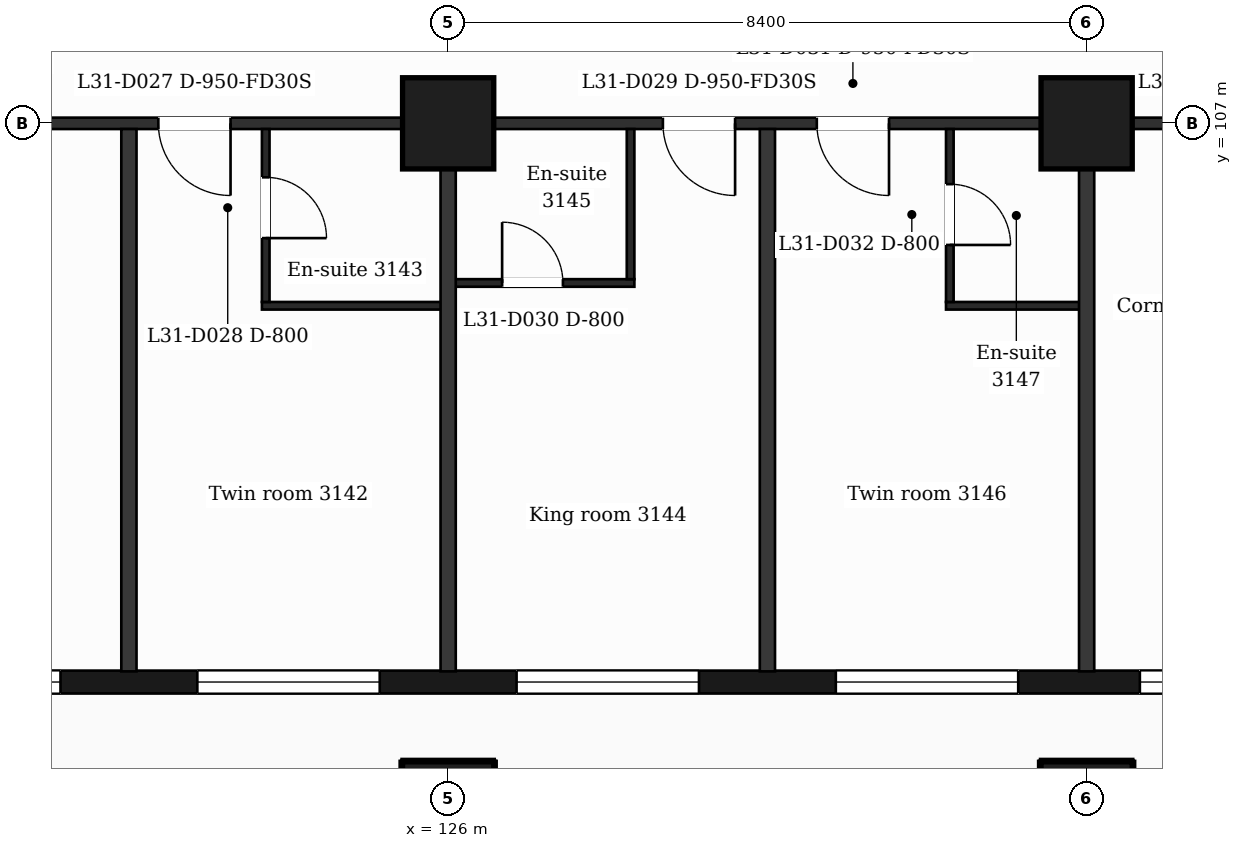
"""IFC4 building model, lengths in metres.
Left out: names, types, materials, properties, quantities, classifications, styles, units other than length and angle.
Written with IfcOpenShell. Run it as: python <this file> out.ifc"""

import sys

from ifc_helpers import new_model, si_unit, direction, frame, frame_2d, origin, origin_2d, place, context, subcontext, project, spatial, rectangle, extrude, element, fill, save


model = new_model("IFC4")
c1 = context("Model", 3, precision=1e-05, world=origin(), true_north=direction((0.0, 1.0)))
c2 = subcontext(c1, "Body", "Model", "MODEL_VIEW")
j1 = project(units=[si_unit("LENGTHUNIT", "METRE"), si_unit("PLANEANGLEUNIT", "RADIAN")], contexts=[c1])
p1 = place(None, origin())
s1 = spatial("IfcSite", under=j1, at=p1, CompositionType="ELEMENT")
p2 = place(p1, origin())
s2 = spatial("IfcBuilding", under=s1, at=p2, CompositionType="ELEMENT")
p3 = place(p2, frame((0.0, 0.0, 131.7)))
s3 = spatial("IfcBuildingStorey", under=s2, at=p3, CompositionType="ELEMENT", Elevation=131.7)
for number, where, z_axis, x_axis in (
    (1, (126.0, 98.0, 0.0), (0.0, 0.0, 1.0), (1.0, 0.0, 0.0)),
    (2, (134.4, 98.0, 0.0), (0.0, 0.0, 1.0), (1.0, 0.0, 0.0)),
    (3, (126.0, 107.0, 0.0), (0.0, 0.0, 1.0), (1.0, 0.0, 0.0)),
    (4, (134.4, 107.0, 0.0), (0.0, 0.0, 1.0), (1.0, 0.0, 0.0)),
):
    element("IfcColumn", number, at=place(p3, frame(where, z_axis=z_axis, x_axis=x_axis)), inside=s3, PredefinedType="COLUMN", context=c2, shape_type="SweptSolid", body=[
        extrude(rectangle(XDim=1.2, YDim=1.2, at=origin_2d()), origin(), (0.0, 0.0, 1.0), 3.7),
    ])
p4 = place(p3, frame((89.85, 99.65, 0.0), z_axis=(0.0, 0.0, 1.0), x_axis=(1.0, 0.0, 0.0)))
e5 = element("IfcWall", 5, at=p4, inside=s3, PredefinedType="SOLIDWALL", context=c2, shape_type="SweptSolid", body=[
    extrude(rectangle(XDim=47.25, YDim=0.3, at=frame_2d((23.625, 0.0))), origin(), (0.0, 0.0, 1.0), 3.2),
])
p5 = place(p4, frame((0.725, 0.0, 0.9)))
e6 = element("IfcOpeningElement", 6, at=p5, cuts=e5, PredefinedType="OPENING", context=c2, shape_type="SweptSolid", body=[
    extrude(rectangle(XDim=1.2, YDim=2.1, at=frame_2d((0.6, 1.05))), frame((0.0, 0.16, 0.0), z_axis=(0.0, -1.0, 0.0), x_axis=(1.0, 0.0, 0.0)), (0.0, 0.0, 1.0), 0.32),
])
p6 = place(p4, frame((3.45, 0.0, 0.9)))
e7 = element("IfcOpeningElement", 7, at=p6, cuts=e5, PredefinedType="OPENING", context=c2, shape_type="SweptSolid", body=[
    extrude(rectangle(XDim=2.4, YDim=2.1, at=frame_2d((1.2, 1.05))), frame((0.0, 0.16, 0.0), z_axis=(0.0, -1.0, 0.0), x_axis=(1.0, 0.0, 0.0)), (0.0, 0.0, 1.0), 0.32),
])
p7 = place(p4, frame((7.35, 0.0, 0.0)))
e8 = element("IfcOpeningElement", 8, at=p7, cuts=e5, PredefinedType="OPENING", context=c2, shape_type="SweptSolid", body=[
    extrude(rectangle(XDim=1.2, YDim=2.4, at=frame_2d((0.6, 1.2))), frame((0.0, 0.16, 0.0), z_axis=(0.0, -1.0, 0.0), x_axis=(1.0, 0.0, 0.0)), (0.0, 0.0, 1.0), 0.32),
])
p8 = place(p4, frame((9.15, 0.0, 0.9)))
e9 = element("IfcOpeningElement", 9, at=p8, cuts=e5, PredefinedType="OPENING", context=c2, shape_type="SweptSolid", body=[
    extrude(rectangle(XDim=1.2, YDim=2.1, at=frame_2d((0.6, 1.05))), frame((0.0, 0.16, 0.0), z_axis=(0.0, -1.0, 0.0), x_axis=(1.0, 0.0, 0.0)), (0.0, 0.0, 1.0), 0.32),
])
p9 = place(p4, frame((11.85, 0.0, 0.9)))
e10 = element("IfcOpeningElement", 10, at=p9, cuts=e5, PredefinedType="OPENING", context=c2, shape_type="SweptSolid", body=[
    extrude(rectangle(XDim=2.4, YDim=2.1, at=frame_2d((1.2, 1.05))), frame((0.0, 0.16, 0.0), z_axis=(0.0, -1.0, 0.0), x_axis=(1.0, 0.0, 0.0)), (0.0, 0.0, 1.0), 0.32),
])
p10 = place(p4, frame((16.05, 0.0, 0.9)))
e11 = element("IfcOpeningElement", 11, at=p10, cuts=e5, PredefinedType="OPENING", context=c2, shape_type="SweptSolid", body=[
    extrude(rectangle(XDim=2.4, YDim=2.1, at=frame_2d((1.2, 1.05))), frame((0.0, 0.16, 0.0), z_axis=(0.0, -1.0, 0.0), x_axis=(1.0, 0.0, 0.0)), (0.0, 0.0, 1.0), 0.32),
])
p11 = place(p4, frame((20.85, 0.0, 0.9)))
e12 = element("IfcOpeningElement", 12, at=p11, cuts=e5, PredefinedType="OPENING", context=c2, shape_type="SweptSolid", body=[
    extrude(rectangle(XDim=1.2, YDim=2.1, at=frame_2d((0.6, 1.05))), frame((0.0, 0.16, 0.0), z_axis=(0.0, -1.0, 0.0), x_axis=(1.0, 0.0, 0.0)), (0.0, 0.0, 1.0), 0.32),
])
p12 = place(p4, frame((25.05, 0.0, 0.9)))
e13 = element("IfcOpeningElement", 13, at=p12, cuts=e5, PredefinedType="OPENING", context=c2, shape_type="SweptSolid", body=[
    extrude(rectangle(XDim=1.2, YDim=2.1, at=frame_2d((0.6, 1.05))), frame((0.0, 0.16, 0.0), z_axis=(0.0, -1.0, 0.0), x_axis=(1.0, 0.0, 0.0)), (0.0, 0.0, 1.0), 0.32),
])
p13 = place(p4, frame((28.65, 0.0, 0.9)))
e14 = element("IfcOpeningElement", 14, at=p13, cuts=e5, PredefinedType="OPENING", context=c2, shape_type="SweptSolid", body=[
    extrude(rectangle(XDim=2.4, YDim=2.1, at=frame_2d((1.2, 1.05))), frame((0.0, 0.16, 0.0), z_axis=(0.0, -1.0, 0.0), x_axis=(1.0, 0.0, 0.0)), (0.0, 0.0, 1.0), 0.32),
])
p14 = place(p4, frame((32.85, 0.0, 0.9)))
e15 = element("IfcOpeningElement", 15, at=p14, cuts=e5, PredefinedType="OPENING", context=c2, shape_type="SweptSolid", body=[
    extrude(rectangle(XDim=2.4, YDim=2.1, at=frame_2d((1.2, 1.05))), frame((0.0, 0.16, 0.0), z_axis=(0.0, -1.0, 0.0), x_axis=(1.0, 0.0, 0.0)), (0.0, 0.0, 1.0), 0.32),
])
p15 = place(p4, frame((37.05, 0.0, 0.9)))
e16 = element("IfcOpeningElement", 16, at=p15, cuts=e5, PredefinedType="OPENING", context=c2, shape_type="SweptSolid", body=[
    extrude(rectangle(XDim=2.4, YDim=2.1, at=frame_2d((1.2, 1.05))), frame((0.0, 0.16, 0.0), z_axis=(0.0, -1.0, 0.0), x_axis=(1.0, 0.0, 0.0)), (0.0, 0.0, 1.0), 0.32),
])
p16 = place(p4, frame((41.25, 0.0, 0.9)))
e17 = element("IfcOpeningElement", 17, at=p16, cuts=e5, PredefinedType="OPENING", context=c2, shape_type="SweptSolid", body=[
    extrude(rectangle(XDim=2.4, YDim=2.1, at=frame_2d((1.2, 1.05))), frame((0.0, 0.16, 0.0), z_axis=(0.0, -1.0, 0.0), x_axis=(1.0, 0.0, 0.0)), (0.0, 0.0, 1.0), 0.32),
])
p17 = place(p4, frame((45.25, 0.0, 0.9)))
e18 = element("IfcOpeningElement", 18, at=p17, cuts=e5, PredefinedType="OPENING", context=c2, shape_type="SweptSolid", body=[
    extrude(rectangle(XDim=1.2, YDim=2.1, at=frame_2d((0.6, 1.05))), frame((0.0, 0.16, 0.0), z_axis=(0.0, -1.0, 0.0), x_axis=(1.0, 0.0, 0.0)), (0.0, 0.0, 1.0), 0.32),
])
p18 = place(p3, frame((123.55, 104.6, 0.0), z_axis=(0.0, 0.0, 1.0), x_axis=(1.0, 0.0, 0.0)))
e19 = element("IfcWall", 19, at=p18, inside=s3, PredefinedType="PARTITIONING", context=c2, shape_type="SweptSolid", body=[
    extrude(rectangle(XDim=2.45, YDim=0.1, at=frame_2d((1.225, 0.0))), origin(), (0.0, 0.0, 1.0), 3.2),
])
p19 = place(p3, frame((132.55, 104.6, 0.0), z_axis=(0.0, 0.0, 1.0), x_axis=(1.0, 0.0, 0.0)))
e20 = element("IfcWall", 20, at=p19, inside=s3, PredefinedType="PARTITIONING", context=c2, shape_type="SweptSolid", body=[
    extrude(rectangle(XDim=1.85, YDim=0.1, at=frame_2d((0.925, 0.0))), origin(), (0.0, 0.0, 1.0), 3.2),
])
p20 = place(p3, frame((126.0, 104.9, 0.0), z_axis=(0.0, 0.0, 1.0), x_axis=(1.0, 0.0, 0.0)))
e21 = element("IfcWall", 21, at=p20, inside=s3, PredefinedType="PARTITIONING", context=c2, shape_type="SweptSolid", body=[
    extrude(rectangle(XDim=2.45, YDim=0.1, at=frame_2d((1.225, 0.0))), origin(), (0.0, 0.0, 1.0), 3.2),
])
p21 = place(p20, frame((0.71, 0.0, 0.0)))
e22 = element("IfcOpeningElement", 22, at=p21, cuts=e21, PredefinedType="OPENING", context=c2, shape_type="SweptSolid", body=[
    extrude(rectangle(XDim=0.8, YDim=2.1, at=frame_2d((0.4, 1.05))), frame((0.0, 0.06, 0.0), z_axis=(0.0, -1.0, 0.0), x_axis=(1.0, 0.0, 0.0)), (0.0, 0.0, 1.0), 0.12),
])
p22 = place(p3, frame((87.018, 107.0, 0.0), z_axis=(0.0, 0.0, 1.0), x_axis=(1.0, 0.0, 0.0)))
e23 = element("IfcWall", 23, at=p22, inside=s3, PredefinedType="PARTITIONING", context=c2, shape_type="SweptSolid", body=[
    extrude(rectangle(XDim=52.765, YDim=0.15, at=frame_2d((26.382, 0.0))), origin(), (0.0, 0.0, 1.0), 3.2),
])
p23 = place(p22, frame((1.276, 0.0, 0.0)))
e24 = element("IfcOpeningElement", 24, at=p23, cuts=e23, PredefinedType="OPENING", context=c2, shape_type="SweptSolid", body=[
    extrude(rectangle(XDim=0.95, YDim=2.1, at=frame_2d((0.475, 1.05))), frame((0.0, 0.085, 0.0), z_axis=(0.0, -1.0, 0.0), x_axis=(1.0, 0.0, 0.0)), (0.0, 0.0, 1.0), 0.17),
])
p24 = place(p22, frame((7.645, 0.0, 0.0)))
e25 = element("IfcOpeningElement", 25, at=p24, cuts=e23, PredefinedType="OPENING", context=c2, shape_type="SweptSolid", body=[
    extrude(rectangle(XDim=0.95, YDim=2.1, at=frame_2d((0.475, 1.05))), frame((0.0, 0.085, 0.0), z_axis=(0.0, -1.0, 0.0), x_axis=(1.0, 0.0, 0.0)), (0.0, 0.0, 1.0), 0.17),
])
p25 = place(p22, frame((16.812, 0.0, 0.0)))
e26 = element("IfcOpeningElement", 26, at=p25, cuts=e23, PredefinedType="OPENING", context=c2, shape_type="SweptSolid", body=[
    extrude(rectangle(XDim=1.0, YDim=2.1, at=frame_2d((0.5, 1.05))), frame((0.0, 0.085, 0.0), z_axis=(0.0, -1.0, 0.0), x_axis=(1.0, 0.0, 0.0)), (0.0, 0.0, 1.0), 0.17),
])
p26 = place(p22, frame((22.952, 0.0, 0.0)))
e27 = element("IfcOpeningElement", 27, at=p26, cuts=e23, PredefinedType="OPENING", context=c2, shape_type="SweptSolid", body=[
    extrude(rectangle(XDim=0.95, YDim=2.1, at=frame_2d((0.475, 1.05))), frame((0.0, 0.085, 0.0), z_axis=(0.0, -1.0, 0.0), x_axis=(1.0, 0.0, 0.0)), (0.0, 0.0, 1.0), 0.17),
])
p27 = place(p22, frame((31.742, 0.0, 0.0)))
e28 = element("IfcOpeningElement", 28, at=p27, cuts=e23, PredefinedType="OPENING", context=c2, shape_type="SweptSolid", body=[
    extrude(rectangle(XDim=0.95, YDim=2.1, at=frame_2d((0.475, 1.05))), frame((0.0, 0.085, 0.0), z_axis=(0.0, -1.0, 0.0), x_axis=(1.0, 0.0, 0.0)), (0.0, 0.0, 1.0), 0.17),
])
p28 = place(p22, frame((35.169, 0.0, 0.0)))
e29 = element("IfcOpeningElement", 29, at=p28, cuts=e23, PredefinedType="OPENING", context=c2, shape_type="SweptSolid", body=[
    extrude(rectangle(XDim=0.95, YDim=2.1, at=frame_2d((0.475, 1.05))), frame((0.0, 0.085, 0.0), z_axis=(0.0, -1.0, 0.0), x_axis=(1.0, 0.0, 0.0)), (0.0, 0.0, 1.0), 0.17),
])
p29 = place(p22, frame((41.807, 0.0, 0.0)))
e30 = element("IfcOpeningElement", 30, at=p29, cuts=e23, PredefinedType="OPENING", context=c2, shape_type="SweptSolid", body=[
    extrude(rectangle(XDim=0.95, YDim=2.1, at=frame_2d((0.475, 1.05))), frame((0.0, 0.085, 0.0), z_axis=(0.0, -1.0, 0.0), x_axis=(1.0, 0.0, 0.0)), (0.0, 0.0, 1.0), 0.17),
])
p30 = place(p22, frame((43.832, 0.0, 0.0)))
e31 = element("IfcOpeningElement", 31, at=p30, cuts=e23, PredefinedType="OPENING", context=c2, shape_type="SweptSolid", body=[
    extrude(rectangle(XDim=0.95, YDim=2.1, at=frame_2d((0.475, 1.05))), frame((0.0, 0.085, 0.0), z_axis=(0.0, -1.0, 0.0), x_axis=(1.0, 0.0, 0.0)), (0.0, 0.0, 1.0), 0.17),
])
p31 = place(p22, frame((48.974, 0.0, 0.0)))
e32 = element("IfcOpeningElement", 32, at=p31, cuts=e23, PredefinedType="OPENING", context=c2, shape_type="SweptSolid", body=[
    extrude(rectangle(XDim=0.95, YDim=2.1, at=frame_2d((0.475, 1.05))), frame((0.0, 0.085, 0.0), z_axis=(0.0, -1.0, 0.0), x_axis=(1.0, 0.0, 0.0)), (0.0, 0.0, 1.0), 0.17),
])
p32 = place(p3, frame((121.8, 99.79, 0.0), z_axis=(0.0, 0.0, 1.0), x_axis=(0.0, 1.0, 0.0)))
e33 = element("IfcWall", 33, at=p32, inside=s3, PredefinedType="PARTITIONING", context=c2, shape_type="SweptSolid", body=[
    extrude(rectangle(XDim=7.135, YDim=0.2, at=frame_2d((3.567, 0.0))), origin(), (0.0, 0.0, 1.0), 3.2),
])
p33 = place(p3, frame((123.6, 104.65, 0.0), z_axis=(0.0, 0.0, 1.0), x_axis=(0.0, 1.0, 0.0)))
e34 = element("IfcWall", 34, at=p33, inside=s3, PredefinedType="PARTITIONING", context=c2, shape_type="SweptSolid", body=[
    extrude(rectangle(XDim=2.275, YDim=0.1, at=frame_2d((1.138, 0.0))), origin(), (0.0, 0.0, 1.0), 3.2),
])
p34 = place(p33, frame((0.84, 0.0, 0.0)))
e35 = element("IfcOpeningElement", 35, at=p34, cuts=e34, PredefinedType="OPENING", context=c2, shape_type="SweptSolid", body=[
    extrude(rectangle(XDim=0.8, YDim=2.1, at=frame_2d((0.4, 1.05))), frame((0.0, 0.06, 0.0), z_axis=(0.0, -1.0, 0.0), x_axis=(1.0, 0.0, 0.0)), (0.0, 0.0, 1.0), 0.12),
])
p35 = place(p3, frame((126.0, 99.79, 0.0), z_axis=(0.0, 0.0, 1.0), x_axis=(0.0, 1.0, 0.0)))
e36 = element("IfcWall", 36, at=p35, inside=s3, PredefinedType="PARTITIONING", context=c2, shape_type="SweptSolid", body=[
    extrude(rectangle(XDim=7.135, YDim=0.2, at=frame_2d((3.567, 0.0))), origin(), (0.0, 0.0, 1.0), 3.2),
])
p36 = place(p3, frame((128.4, 104.95, 0.0), z_axis=(0.0, 0.0, 1.0), x_axis=(0.0, 1.0, 0.0)))
e37 = element("IfcWall", 37, at=p36, inside=s3, PredefinedType="PARTITIONING", context=c2, shape_type="SweptSolid", body=[
    extrude(rectangle(XDim=1.975, YDim=0.1, at=frame_2d((0.988, 0.0))), origin(), (0.0, 0.0, 1.0), 3.2),
])
p37 = place(p3, frame((130.2, 99.79, 0.0), z_axis=(0.0, 0.0, 1.0), x_axis=(0.0, 1.0, 0.0)))
e38 = element("IfcWall", 38, at=p37, inside=s3, PredefinedType="PARTITIONING", context=c2, shape_type="SweptSolid", body=[
    extrude(rectangle(XDim=7.135, YDim=0.2, at=frame_2d((3.567, 0.0))), origin(), (0.0, 0.0, 1.0), 3.2),
])
p38 = place(p3, frame((132.6, 104.65, 0.0), z_axis=(0.0, 0.0, 1.0), x_axis=(0.0, 1.0, 0.0)))
e39 = element("IfcWall", 39, at=p38, inside=s3, PredefinedType="PARTITIONING", context=c2, shape_type="SweptSolid", body=[
    extrude(rectangle(XDim=2.275, YDim=0.1, at=frame_2d((1.138, 0.0))), origin(), (0.0, 0.0, 1.0), 3.2),
])
p39 = place(p38, frame((0.75, 0.0, 0.0)))
e40 = element("IfcOpeningElement", 40, at=p39, cuts=e39, PredefinedType="OPENING", context=c2, shape_type="SweptSolid", body=[
    extrude(rectangle(XDim=0.8, YDim=2.1, at=frame_2d((0.4, 1.05))), frame((0.0, 0.06, 0.0), z_axis=(0.0, -1.0, 0.0), x_axis=(1.0, 0.0, 0.0)), (0.0, 0.0, 1.0), 0.12),
])
p40 = place(p3, frame((134.4, 99.79, 0.0), z_axis=(0.0, 0.0, 1.0), x_axis=(0.0, 1.0, 0.0)))
e41 = element("IfcWall", 41, at=p40, inside=s3, PredefinedType="PARTITIONING", context=c2, shape_type="SweptSolid", body=[
    extrude(rectangle(XDim=7.135, YDim=0.2, at=frame_2d((3.567, 0.0))), origin(), (0.0, 0.0, 1.0), 3.2),
])
p41 = place(p13, origin())
e42 = element("IfcWindow", 42, at=p41, inside=s3, PartitioningType="SINGLE_PANEL", PredefinedType="WINDOW", context=c2, shape_type="SweptSolid", body=[
    extrude(rectangle(XDim=2.4, YDim=2.1, at=frame_2d((1.2, 1.05))), frame((0.0, 0.03, 0.0), z_axis=(0.0, -1.0, 0.0), x_axis=(1.0, 0.0, 0.0)), (0.0, 0.0, 1.0), 0.06),
])
fill(e14, e42)
p42 = place(p14, origin())
e43 = element("IfcWindow", 43, at=p42, inside=s3, PartitioningType="SINGLE_PANEL", PredefinedType="WINDOW", context=c2, shape_type="SweptSolid", body=[
    extrude(rectangle(XDim=2.4, YDim=2.1, at=frame_2d((1.2, 1.05))), frame((0.0, 0.03, 0.0), z_axis=(0.0, -1.0, 0.0), x_axis=(1.0, 0.0, 0.0)), (0.0, 0.0, 1.0), 0.06),
])
fill(e15, e43)
p43 = place(p15, origin())
e44 = element("IfcWindow", 44, at=p43, inside=s3, PartitioningType="SINGLE_PANEL", PredefinedType="WINDOW", context=c2, shape_type="SweptSolid", body=[
    extrude(rectangle(XDim=2.4, YDim=2.1, at=frame_2d((1.2, 1.05))), frame((0.0, 0.03, 0.0), z_axis=(0.0, -1.0, 0.0), x_axis=(1.0, 0.0, 0.0)), (0.0, 0.0, 1.0), 0.06),
])
fill(e16, e44)
p44 = place(p16, origin())
e45 = element("IfcWindow", 45, at=p44, inside=s3, PartitioningType="SINGLE_PANEL", PredefinedType="WINDOW", context=c2, shape_type="SweptSolid", body=[
    extrude(rectangle(XDim=2.4, YDim=2.1, at=frame_2d((1.2, 1.05))), frame((0.0, 0.03, 0.0), z_axis=(0.0, -1.0, 0.0), x_axis=(1.0, 0.0, 0.0)), (0.0, 0.0, 1.0), 0.06),
])
fill(e17, e45)
p45 = place(p17, origin())
e46 = element("IfcWindow", 46, at=p45, inside=s3, PartitioningType="SINGLE_PANEL", PredefinedType="WINDOW", context=c2, shape_type="SweptSolid", body=[
    extrude(rectangle(XDim=1.2, YDim=2.1, at=frame_2d((0.6, 1.05))), frame((0.0, 0.03, 0.0), z_axis=(0.0, -1.0, 0.0), x_axis=(1.0, 0.0, 0.0)), (0.0, 0.0, 1.0), 0.06),
])
fill(e18, e46)
p46 = place(p28, origin())
e47 = element("IfcDoor", 47, at=p46, inside=s3, OperationType="SINGLE_SWING_RIGHT", PredefinedType="DOOR", context=c2, shape_type="SweptSolid", body=[
    extrude(rectangle(XDim=0.95, YDim=2.1, at=frame_2d((0.475, 1.05))), frame((0.0, 0.025, 0.0), z_axis=(0.0, -1.0, 0.0), x_axis=(1.0, 0.0, 0.0)), (0.0, 0.0, 1.0), 0.05),
])
fill(e29, e47)
p47 = place(p34, origin())
e48 = element("IfcDoor", 48, at=p47, inside=s3, OperationType="SINGLE_SWING_LEFT", PredefinedType="DOOR", context=c2, shape_type="SweptSolid", body=[
    extrude(rectangle(XDim=0.8, YDim=2.1, at=frame_2d((0.4, 1.05))), frame((0.0, 0.025, 0.0), z_axis=(0.0, -1.0, 0.0), x_axis=(1.0, 0.0, 0.0)), (0.0, 0.0, 1.0), 0.05),
])
fill(e35, e48)
p48 = place(p29, origin())
e49 = element("IfcDoor", 49, at=p48, inside=s3, OperationType="SINGLE_SWING_RIGHT", PredefinedType="DOOR", context=c2, shape_type="SweptSolid", body=[
    extrude(rectangle(XDim=0.95, YDim=2.1, at=frame_2d((0.475, 1.05))), frame((0.0, 0.025, 0.0), z_axis=(0.0, -1.0, 0.0), x_axis=(1.0, 0.0, 0.0)), (0.0, 0.0, 1.0), 0.05),
])
fill(e30, e49)
p49 = place(p21, origin())
e50 = element("IfcDoor", 50, at=p49, inside=s3, OperationType="SINGLE_SWING_LEFT", PredefinedType="DOOR", context=c2, shape_type="SweptSolid", body=[
    extrude(rectangle(XDim=0.8, YDim=2.1, at=frame_2d((0.4, 1.05))), frame((0.0, 0.025, 0.0), z_axis=(0.0, -1.0, 0.0), x_axis=(1.0, 0.0, 0.0)), (0.0, 0.0, 1.0), 0.05),
])
fill(e22, e50)
p50 = place(p30, origin())
e51 = element("IfcDoor", 51, at=p50, inside=s3, OperationType="SINGLE_SWING_RIGHT", PredefinedType="DOOR", context=c2, shape_type="SweptSolid", body=[
    extrude(rectangle(XDim=0.95, YDim=2.1, at=frame_2d((0.475, 1.05))), frame((0.0, 0.025, 0.0), z_axis=(0.0, -1.0, 0.0), x_axis=(1.0, 0.0, 0.0)), (0.0, 0.0, 1.0), 0.05),
])
fill(e31, e51)
p51 = place(p39, origin())
e52 = element("IfcDoor", 52, at=p51, inside=s3, OperationType="SINGLE_SWING_LEFT", PredefinedType="DOOR", context=c2, shape_type="SweptSolid", body=[
    extrude(rectangle(XDim=0.8, YDim=2.1, at=frame_2d((0.4, 1.05))), frame((0.0, 0.025, 0.0), z_axis=(0.0, -1.0, 0.0), x_axis=(1.0, 0.0, 0.0)), (0.0, 0.0, 1.0), 0.05),
])
fill(e40, e52)
save(model, sys.argv[1])
